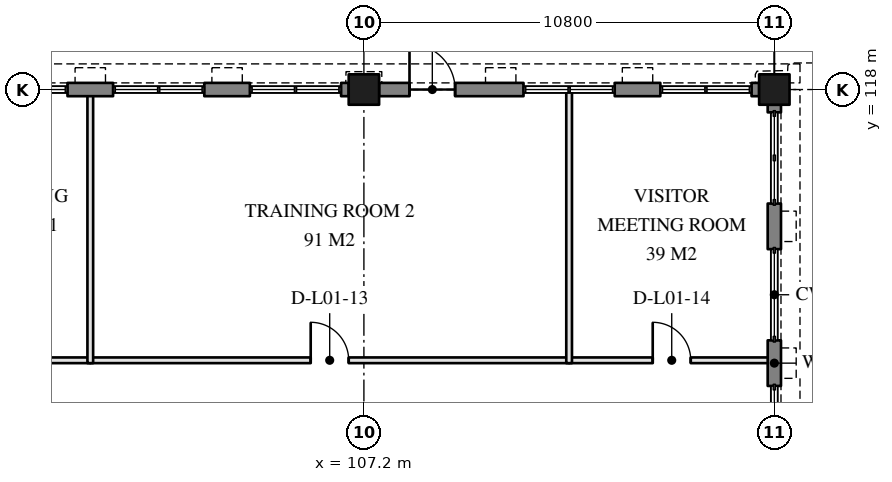
"""IFC4 building model, lengths in metres.
Left out: names, types, materials, properties, quantities, classifications, styles, units other than length and angle.
Written with IfcOpenShell. Run it as: python <this file> out.ifc"""

import sys

from ifc_helpers import new_model, si_unit, direction, frame, frame_2d, origin, origin_2d, place, context, subcontext, project, spatial, rectangle, extrude, element, fill, save


model = new_model("IFC4")
c1 = context("Model", 3, precision=1e-05, world=origin(), true_north=direction((0.0, 1.0)))
c2 = subcontext(c1, "Body", "Model", "MODEL_VIEW")
j1 = project(units=[si_unit("LENGTHUNIT", "METRE"), si_unit("PLANEANGLEUNIT", "RADIAN")], contexts=[c1])
p1 = place(None, origin())
s1 = spatial("IfcSite", under=j1, at=p1, CompositionType="ELEMENT")
p2 = place(p1, origin())
s2 = spatial("IfcBuilding", under=s1, at=p2, CompositionType="ELEMENT")
p3 = place(p2, frame((0.0, 0.0, 4.8)))
s3 = spatial("IfcBuildingStorey", under=s2, at=p3, CompositionType="ELEMENT", Elevation=4.8)
for number, where, z_axis, x_axis in (
    (1, (107.2, 118.0, -1.3), (0.0, 0.0, 1.0), (1.0, 0.0, 0.0)),
    (2, (118.0, 118.0, -1.3), (0.0, 0.0, 1.0), (1.0, 0.0, 0.0)),
):
    element("IfcColumn", number, at=place(p3, frame(where, z_axis=z_axis, x_axis=x_axis)), inside=s3, PredefinedType="COLUMN", context=c2, shape_type="SweptSolid", body=[
        extrude(rectangle(XDim=0.8, YDim=0.8, at=origin_2d()), origin(), (0.0, 0.0, 1.0), 5.2),
    ])
p4 = place(p3, frame((99.4, 118.0, 0.0), z_axis=(0.0, 0.0, 1.0), x_axis=(1.0, 0.0, 0.0)))
e3 = element("IfcWall", 3, at=p4, inside=s3, PredefinedType="SOLIDWALL", context=c2, shape_type="SweptSolid", body=[
    extrude(rectangle(XDim=1.2, YDim=0.35, at=frame_2d((0.6, 0.0))), origin(), (0.0, 0.0, 1.0), 2.8),
])
p5 = place(p3, frame((103.0, 118.0, 0.0), z_axis=(0.0, 0.0, 1.0), x_axis=(1.0, 0.0, 0.0)))
e4 = element("IfcWall", 4, at=p5, inside=s3, PredefinedType="SOLIDWALL", context=c2, shape_type="SweptSolid", body=[
    extrude(rectangle(XDim=1.2, YDim=0.35, at=frame_2d((0.6, 0.0))), origin(), (0.0, 0.0, 1.0), 2.8),
])
p6 = place(p3, frame((106.6, 118.0, 0.0), z_axis=(0.0, 0.0, 1.0), x_axis=(1.0, 0.0, 0.0)))
e5 = element("IfcWall", 5, at=p6, inside=s3, PredefinedType="SOLIDWALL", context=c2, shape_type="SweptSolid", body=[
    extrude(rectangle(XDim=0.2, YDim=0.35, at=frame_2d((0.1, 0.0))), origin(), (0.0, 0.0, 1.0), 3.6),
])
p7 = place(p3, frame((107.6, 118.0, 0.0), z_axis=(0.0, 0.0, 1.0), x_axis=(1.0, 0.0, 0.0)))
e6 = element("IfcWall", 6, at=p7, inside=s3, PredefinedType="SOLIDWALL", context=c2, shape_type="SweptSolid", body=[
    extrude(rectangle(XDim=3.8, YDim=0.35, at=frame_2d((1.9, 0.0))), origin(), (0.0, 0.0, 1.0), 2.8),
])
p8 = place(p7, frame((0.8, 0.0, 0.0)))
e7 = element("IfcOpeningElement", 7, at=p8, cuts=e6, PredefinedType="OPENING", context=c2, shape_type="SweptSolid", body=[
    extrude(rectangle(XDim=1.2, YDim=2.4, at=frame_2d((0.6, 1.2))), frame((0.0, 0.185, 0.0), z_axis=(0.0, -1.0, 0.0), x_axis=(1.0, 0.0, 0.0)), (0.0, 0.0, 1.0), 0.37),
])
p9 = place(p3, frame((113.8, 118.0, 0.0), z_axis=(0.0, 0.0, 1.0), x_axis=(1.0, 0.0, 0.0)))
e8 = element("IfcWall", 8, at=p9, inside=s3, PredefinedType="SOLIDWALL", context=c2, shape_type="SweptSolid", body=[
    extrude(rectangle(XDim=1.2, YDim=0.35, at=frame_2d((0.6, 0.0))), origin(), (0.0, 0.0, 1.0), 2.8),
])
p10 = place(p3, frame((117.4, 118.0, 0.0), z_axis=(0.0, 0.0, 1.0), x_axis=(1.0, 0.0, 0.0)))
e9 = element("IfcWall", 9, at=p10, inside=s3, PredefinedType="SOLIDWALL", context=c2, shape_type="SweptSolid", body=[
    extrude(rectangle(XDim=0.2, YDim=0.35, at=frame_2d((0.1, 0.0))), origin(), (0.0, 0.0, 1.0), 3.6),
])
for number, where, z_axis, x_axis in (
    (10, (118.0, 110.2, 0.0), (0.0, 0.0, 1.0), (0.0, 1.0, 0.0)),
    (11, (118.0, 113.8, 0.0), (0.0, 0.0, 1.0), (0.0, 1.0, 0.0)),
):
    element("IfcWall", number, at=place(p3, frame(where, z_axis=z_axis, x_axis=x_axis)), inside=s3, PredefinedType="SOLIDWALL", context=c2, shape_type="SweptSolid", body=[
        extrude(rectangle(XDim=1.2, YDim=0.35, at=frame_2d((0.6, 0.0))), origin(), (0.0, 0.0, 1.0), 2.8),
    ])
p11 = place(p3, frame((118.0, 117.4, 0.0), z_axis=(0.0, 0.0, 1.0), x_axis=(0.0, 1.0, 0.0)))
e12 = element("IfcWall", 12, at=p11, inside=s3, PredefinedType="SOLIDWALL", context=c2, shape_type="SweptSolid", body=[
    extrude(rectangle(XDim=0.2, YDim=0.35, at=frame_2d((0.1, 0.0))), origin(), (0.0, 0.0, 1.0), 3.6),
])
p12 = place(p3, frame((85.6, 110.875, 0.0), z_axis=(0.0, 0.0, 1.0), x_axis=(1.0, 0.0, 0.0)))
e13 = element("IfcWall", 13, at=p12, inside=s3, PredefinedType="PARTITIONING", context=c2, shape_type="SweptSolid", body=[
    extrude(rectangle(XDim=14.4, YDim=0.15, at=frame_2d((7.2, 0.0))), origin(), (0.0, 0.0, 1.0), 2.8),
])
p13 = place(p12, frame((6.3, 0.0, 0.0)))
e14 = element("IfcOpeningElement", 14, at=p13, cuts=e13, PredefinedType="OPENING", context=c2, shape_type="SweptSolid", body=[
    extrude(rectangle(XDim=1.8, YDim=2.1, at=frame_2d((0.9, 1.05))), frame((0.0, 0.085, 0.0), z_axis=(0.0, -1.0, 0.0), x_axis=(1.0, 0.0, 0.0)), (0.0, 0.0, 1.0), 0.17),
])
p14 = place(p3, frame((100.0, 110.875, 0.0), z_axis=(0.0, 0.0, 1.0), x_axis=(1.0, 0.0, 0.0)))
e15 = element("IfcWall", 15, at=p14, inside=s3, PredefinedType="PARTITIONING", context=c2, shape_type="SweptSolid", body=[
    extrude(rectangle(XDim=12.6, YDim=0.15, at=frame_2d((6.3, 0.0))), origin(), (0.0, 0.0, 1.0), 2.8),
])
p15 = place(p14, frame((5.8, 0.0, 0.0)))
e16 = element("IfcOpeningElement", 16, at=p15, cuts=e15, PredefinedType="OPENING", context=c2, shape_type="SweptSolid", body=[
    extrude(rectangle(XDim=1.0, YDim=2.1, at=frame_2d((0.5, 1.05))), frame((0.0, 0.085, 0.0), z_axis=(0.0, -1.0, 0.0), x_axis=(1.0, 0.0, 0.0)), (0.0, 0.0, 1.0), 0.17),
])
p16 = place(p3, frame((112.6, 110.875, 0.0), z_axis=(0.0, 0.0, 1.0), x_axis=(1.0, 0.0, 0.0)))
e17 = element("IfcWall", 17, at=p16, inside=s3, PredefinedType="PARTITIONING", context=c2, shape_type="SweptSolid", body=[
    extrude(rectangle(XDim=5.4, YDim=0.15, at=frame_2d((2.7, 0.0))), origin(), (0.0, 0.0, 1.0), 2.8),
])
p17 = place(p16, frame((2.2, 0.0, 0.0)))
e18 = element("IfcOpeningElement", 18, at=p17, cuts=e17, PredefinedType="OPENING", context=c2, shape_type="SweptSolid", body=[
    extrude(rectangle(XDim=1.0, YDim=2.1, at=frame_2d((0.5, 1.05))), frame((0.0, 0.085, 0.0), z_axis=(0.0, -1.0, 0.0), x_axis=(1.0, 0.0, 0.0)), (0.0, 0.0, 1.0), 0.17),
])
for number, where, z_axis, x_axis in (
    (19, (100.0, 110.8, 0.0), (0.0, 0.0, 1.0), (0.0, 1.0, 0.0)),
    (20, (112.6, 110.8, 0.0), (0.0, 0.0, 1.0), (0.0, 1.0, 0.0)),
):
    element("IfcWall", number, at=place(p3, frame(where, z_axis=z_axis, x_axis=x_axis)), inside=s3, PredefinedType="PARTITIONING", context=c2, shape_type="SweptSolid", body=[
        extrude(rectangle(XDim=7.2, YDim=0.15, at=frame_2d((3.6, 0.0))), origin(), (0.0, 0.0, 1.0), 2.8),
    ])
p18 = place(p8, origin())
e21 = element("IfcDoor", 21, at=p18, inside=s3, OperationType="SINGLE_SWING_LEFT", PredefinedType="DOOR", context=c2, shape_type="SweptSolid", body=[
    extrude(rectangle(XDim=1.2, YDim=2.4, at=frame_2d((0.6, 1.2))), frame((0.0, 0.025, 0.0), z_axis=(0.0, -1.0, 0.0), x_axis=(1.0, 0.0, 0.0)), (0.0, 0.0, 1.0), 0.05),
])
fill(e7, e21)
p19 = place(p15, frame((1.0, 0.0, 0.0), z_axis=(0.0, 0.0, 1.0), x_axis=(-1.0, 0.0, 0.0)))
e22 = element("IfcDoor", 22, at=p19, inside=s3, OperationType="SINGLE_SWING_RIGHT", PredefinedType="DOOR", context=c2, shape_type="SweptSolid", body=[
    extrude(rectangle(XDim=1.0, YDim=2.1, at=frame_2d((0.5, 1.05))), frame((0.0, 0.025, 0.0), z_axis=(0.0, -1.0, 0.0), x_axis=(1.0, 0.0, 0.0)), (0.0, 0.0, 1.0), 0.05),
])
fill(e16, e22)
p20 = place(p17, origin())
e23 = element("IfcDoor", 23, at=p20, inside=s3, OperationType="SINGLE_SWING_LEFT", PredefinedType="DOOR", context=c2, shape_type="SweptSolid", body=[
    extrude(rectangle(XDim=1.0, YDim=2.1, at=frame_2d((0.5, 1.05))), frame((0.0, 0.025, 0.0), z_axis=(0.0, -1.0, 0.0), x_axis=(1.0, 0.0, 0.0)), (0.0, 0.0, 1.0), 0.05),
])
fill(e18, e23)
save(model, sys.argv[1])
